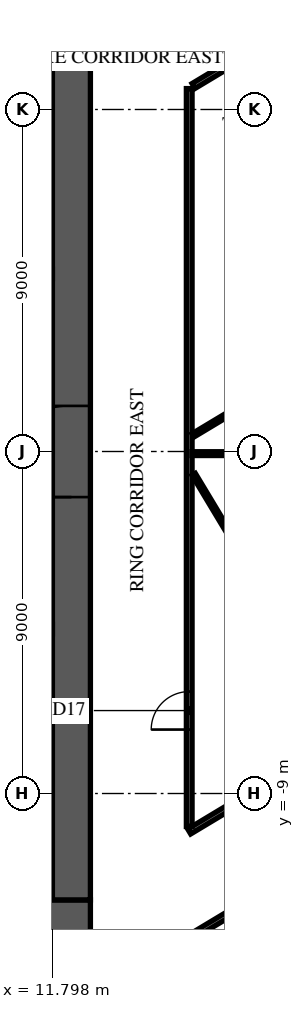
"""IFC4 building model, lengths in metres.
Left out: names, types, materials, properties, quantities, classifications, styles, units other than length and angle.
Written with IfcOpenShell. Run it as: python <this file> out.ifc"""

import sys

from ifc_helpers import new_model, si_unit, direction, frame, frame_2d, origin, place, context, subcontext, project, spatial, rectangle, extrude, element, fill, save


model = new_model("IFC4")
c1 = context("Model", 3, precision=1e-05, world=origin(), true_north=direction((0.0, 1.0)))
c2 = subcontext(c1, "Body", "Model", "MODEL_VIEW")
j1 = project(units=[si_unit("LENGTHUNIT", "METRE"), si_unit("PLANEANGLEUNIT", "RADIAN")], contexts=[c1])
p1 = place(None, origin())
s1 = spatial("IfcSite", under=j1, at=p1, CompositionType="ELEMENT")
p2 = place(p1, origin())
s2 = spatial("IfcBuilding", under=s1, at=p2, CompositionType="ELEMENT")
p3 = place(p2, frame((0.0, 0.0, 147.7)))
s3 = spatial("IfcBuildingStorey", under=s2, at=p3, CompositionType="ELEMENT", Elevation=147.7)
p4 = place(p3, frame((-12.8, -12.3, 0.0), z_axis=(0.0, 0.0, 1.0), x_axis=(1.0, 0.0, 0.0)))
e1 = element("IfcWall", 1, at=p4, inside=s3, PredefinedType="SHEAR", context=c2, shape_type="SweptSolid", body=[
    extrude(rectangle(XDim=25.6, YDim=1.0, at=frame_2d((12.8, 0.0))), origin(), (0.0, 0.0, 1.0), 3.6),
])
p5 = place(p4, frame((7.7, 0.0, 0.0)))
e2 = element("IfcOpeningElement", 2, at=p5, cuts=e1, PredefinedType="OPENING", context=c2, shape_type="SweptSolid", body=[
    extrude(rectangle(XDim=2.0, YDim=2.1, at=frame_2d((1.0, 1.05))), frame((0.0, 0.51, 0.0), z_axis=(0.0, -1.0, 0.0), x_axis=(1.0, 0.0, 0.0)), (0.0, 0.0, 1.0), 1.02),
])
p6 = place(p4, frame((17.825, 0.0, 0.0)))
e3 = element("IfcOpeningElement", 3, at=p6, cuts=e1, PredefinedType="OPENING", context=c2, shape_type="SweptSolid", body=[
    extrude(rectangle(XDim=1.2, YDim=2.1, at=frame_2d((0.6, 1.05))), frame((0.0, 0.51, 0.0), z_axis=(0.0, -1.0, 0.0), x_axis=(1.0, 0.0, 0.0)), (0.0, 0.0, 1.0), 1.02),
])
p7 = place(p4, frame((1.975, 0.0, 0.0)))
e4 = element("IfcOpeningElement", 4, at=p7, cuts=e1, PredefinedType="OPENING", context=c2, shape_type="SweptSolid", body=[
    extrude(rectangle(XDim=1.2, YDim=2.1, at=frame_2d((0.6, 1.05))), frame((0.0, 0.51, 0.0), z_axis=(0.0, -1.0, 0.0), x_axis=(1.0, 0.0, 0.0)), (0.0, 0.0, 1.0), 1.02),
])
p8 = place(p4, frame((22.425, 0.0, 0.0)))
e5 = element("IfcOpeningElement", 5, at=p8, cuts=e1, PredefinedType="OPENING", context=c2, shape_type="SweptSolid", body=[
    extrude(rectangle(XDim=1.2, YDim=2.1, at=frame_2d((0.6, 1.05))), frame((0.0, 0.51, 0.0), z_axis=(0.0, -1.0, 0.0), x_axis=(1.0, 0.0, 0.0)), (0.0, 0.0, 1.0), 1.02),
])
p9 = place(p3, frame((12.3, -11.8, 0.0), z_axis=(0.0, 0.0, 1.0), x_axis=(0.0, 1.0, 0.0)))
e6 = element("IfcWall", 6, at=p9, inside=s3, PredefinedType="SHEAR", context=c2, shape_type="SweptSolid", body=[
    extrude(rectangle(XDim=23.6, YDim=1.0, at=frame_2d((11.8, 0.0))), origin(), (0.0, 0.0, 1.0), 3.6),
])
p10 = place(p9, frame((10.6, 0.0, 0.0)))
e7 = element("IfcOpeningElement", 7, at=p10, cuts=e6, PredefinedType="OPENING", context=c2, shape_type="SweptSolid", body=[
    extrude(rectangle(XDim=2.4, YDim=2.4, at=frame_2d((1.2, 1.2))), frame((0.0, 0.51, 0.0), z_axis=(0.0, -1.0, 0.0), x_axis=(1.0, 0.0, 0.0)), (0.0, 0.0, 1.0), 1.02),
])
for number, where, z_axis, x_axis in (
    (8, (8.65, 4.675, 0.0), (0.0, 0.0, 1.0), (1.0, 0.0, 0.0)),
    (9, (8.65, -4.675, 0.0), (0.0, 0.0, 1.0), (1.0, 0.0, 0.0)),
):
    element("IfcWall", number, at=place(p3, frame(where, z_axis=z_axis, x_axis=x_axis)), inside=s3, PredefinedType="SOLIDWALL", context=c2, shape_type="SweptSolid", body=[
        extrude(rectangle(XDim=3.15, YDim=0.25, at=frame_2d((1.575, 0.0))), origin(), (0.0, 0.0, 1.0), 3.6),
    ])
p11 = place(p3, frame((-7.88, -35.184, 0.0), z_axis=(0.0, 0.0, 1.0), x_axis=(0.857165846238, 0.515040495536, 0.0)))
e10 = element("IfcWall", 10, at=p11, inside=s3, PredefinedType="STANDARD", context=c2, shape_type="SweptSolid", body=[
    extrude(rectangle(XDim=49.751, YDim=0.6, at=frame_2d((24.876, 0.0))), origin(), (0.0, 0.0, 1.0), 3.6),
])
p12 = place(p11, frame((1.161, 0.0, 0.9)))
e11 = element("IfcOpeningElement", 11, at=p12, cuts=e10, PredefinedType="OPENING", context=c2, shape_type="SweptSolid", body=[
    extrude(rectangle(XDim=2.1, YDim=2.1, at=frame_2d((1.05, 1.05))), frame((0.0, 0.31, 0.0), z_axis=(0.0, -1.0, 0.0), x_axis=(1.0, 0.0, 0.0)), (0.0, 0.0, 1.0), 0.62),
])
p13 = place(p11, frame((5.644, 0.0, 0.9)))
e12 = element("IfcOpeningElement", 12, at=p13, cuts=e10, PredefinedType="OPENING", context=c2, shape_type="SweptSolid", body=[
    extrude(rectangle(XDim=2.1, YDim=2.1, at=frame_2d((1.05, 1.05))), frame((0.0, 0.31, 0.0), z_axis=(0.0, -1.0, 0.0), x_axis=(1.0, 0.0, 0.0)), (0.0, 0.0, 1.0), 0.62),
])
p14 = place(p11, frame((10.189, 0.0, 0.9)))
e13 = element("IfcOpeningElement", 13, at=p14, cuts=e10, PredefinedType="OPENING", context=c2, shape_type="SweptSolid", body=[
    extrude(rectangle(XDim=2.1, YDim=2.1, at=frame_2d((1.05, 1.05))), frame((0.0, 0.31, 0.0), z_axis=(0.0, -1.0, 0.0), x_axis=(1.0, 0.0, 0.0)), (0.0, 0.0, 1.0), 0.62),
])
p15 = place(p11, frame((14.735, 0.0, 0.9)))
e14 = element("IfcOpeningElement", 14, at=p15, cuts=e10, PredefinedType="OPENING", context=c2, shape_type="SweptSolid", body=[
    extrude(rectangle(XDim=2.1, YDim=2.1, at=frame_2d((1.05, 1.05))), frame((0.0, 0.31, 0.0), z_axis=(0.0, -1.0, 0.0), x_axis=(1.0, 0.0, 0.0)), (0.0, 0.0, 1.0), 0.62),
])
p16 = place(p11, frame((19.28, 0.0, 0.9)))
e15 = element("IfcOpeningElement", 15, at=p16, cuts=e10, PredefinedType="OPENING", context=c2, shape_type="SweptSolid", body=[
    extrude(rectangle(XDim=2.1, YDim=2.1, at=frame_2d((1.05, 1.05))), frame((0.0, 0.31, 0.0), z_axis=(0.0, -1.0, 0.0), x_axis=(1.0, 0.0, 0.0)), (0.0, 0.0, 1.0), 0.62),
])
p17 = place(p11, frame((23.826, 0.0, 0.9)))
e16 = element("IfcOpeningElement", 16, at=p17, cuts=e10, PredefinedType="OPENING", context=c2, shape_type="SweptSolid", body=[
    extrude(rectangle(XDim=2.1, YDim=2.1, at=frame_2d((1.05, 1.05))), frame((0.0, 0.31, 0.0), z_axis=(0.0, -1.0, 0.0), x_axis=(1.0, 0.0, 0.0)), (0.0, 0.0, 1.0), 0.62),
])
p18 = place(p11, frame((28.371, 0.0, 0.9)))
e17 = element("IfcOpeningElement", 17, at=p18, cuts=e10, PredefinedType="OPENING", context=c2, shape_type="SweptSolid", body=[
    extrude(rectangle(XDim=2.1, YDim=2.1, at=frame_2d((1.05, 1.05))), frame((0.0, 0.31, 0.0), z_axis=(0.0, -1.0, 0.0), x_axis=(1.0, 0.0, 0.0)), (0.0, 0.0, 1.0), 0.62),
])
p19 = place(p11, frame((32.917, 0.0, 0.9)))
e18 = element("IfcOpeningElement", 18, at=p19, cuts=e10, PredefinedType="OPENING", context=c2, shape_type="SweptSolid", body=[
    extrude(rectangle(XDim=2.1, YDim=2.1, at=frame_2d((1.05, 1.05))), frame((0.0, 0.31, 0.0), z_axis=(0.0, -1.0, 0.0), x_axis=(1.0, 0.0, 0.0)), (0.0, 0.0, 1.0), 0.62),
])
p20 = place(p11, frame((37.462, 0.0, 0.9)))
e19 = element("IfcOpeningElement", 19, at=p20, cuts=e10, PredefinedType="OPENING", context=c2, shape_type="SweptSolid", body=[
    extrude(rectangle(XDim=2.1, YDim=2.1, at=frame_2d((1.05, 1.05))), frame((0.0, 0.31, 0.0), z_axis=(0.0, -1.0, 0.0), x_axis=(1.0, 0.0, 0.0)), (0.0, 0.0, 1.0), 0.62),
])
p21 = place(p11, frame((42.008, 0.0, 0.9)))
e20 = element("IfcOpeningElement", 20, at=p21, cuts=e10, PredefinedType="OPENING", context=c2, shape_type="SweptSolid", body=[
    extrude(rectangle(XDim=2.1, YDim=2.1, at=frame_2d((1.05, 1.05))), frame((0.0, 0.31, 0.0), z_axis=(0.0, -1.0, 0.0), x_axis=(1.0, 0.0, 0.0)), (0.0, 0.0, 1.0), 0.62),
])
p22 = place(p11, frame((46.491, 0.0, 0.9)))
e21 = element("IfcOpeningElement", 21, at=p22, cuts=e10, PredefinedType="OPENING", context=c2, shape_type="SweptSolid", body=[
    extrude(rectangle(XDim=2.1, YDim=2.1, at=frame_2d((1.05, 1.05))), frame((0.0, 0.31, 0.0), z_axis=(0.0, -1.0, 0.0), x_axis=(1.0, 0.0, 0.0)), (0.0, 0.0, 1.0), 0.62),
])
p23 = place(p3, frame((36.416, -2.94, 0.0), z_axis=(0.0, 0.0, 1.0), x_axis=(-0.515039615037, 0.857166375299, 0.0)))
e22 = element("IfcWall", 22, at=p23, inside=s3, PredefinedType="STANDARD", context=c2, shape_type="SweptSolid", body=[
    extrude(rectangle(XDim=42.176, YDim=0.6, at=frame_2d((21.088, 0.0))), origin(), (0.0, 0.0, 1.0), 3.6),
])
p24 = place(p23, frame((1.138, 0.0, 0.9)))
e23 = element("IfcOpeningElement", 23, at=p24, cuts=e22, PredefinedType="OPENING", context=c2, shape_type="SweptSolid", body=[
    extrude(rectangle(XDim=2.3, YDim=2.1, at=frame_2d((1.15, 1.05))), frame((0.0, 0.31, 0.0), z_axis=(0.0, -1.0, 0.0), x_axis=(1.0, 0.0, 0.0)), (0.0, 0.0, 1.0), 0.62),
])
p25 = place(p23, frame((5.776, 0.0, 0.9)))
e24 = element("IfcOpeningElement", 24, at=p25, cuts=e22, PredefinedType="OPENING", context=c2, shape_type="SweptSolid", body=[
    extrude(rectangle(XDim=2.3, YDim=2.1, at=frame_2d((1.15, 1.05))), frame((0.0, 0.31, 0.0), z_axis=(0.0, -1.0, 0.0), x_axis=(1.0, 0.0, 0.0)), (0.0, 0.0, 1.0), 0.62),
])
p26 = place(p23, frame((10.476, 0.0, 0.9)))
e25 = element("IfcOpeningElement", 25, at=p26, cuts=e22, PredefinedType="OPENING", context=c2, shape_type="SweptSolid", body=[
    extrude(rectangle(XDim=2.3, YDim=2.1, at=frame_2d((1.15, 1.05))), frame((0.0, 0.31, 0.0), z_axis=(0.0, -1.0, 0.0), x_axis=(1.0, 0.0, 0.0)), (0.0, 0.0, 1.0), 0.62),
])
p27 = place(p23, frame((15.176, 0.0, 0.9)))
e26 = element("IfcOpeningElement", 26, at=p27, cuts=e22, PredefinedType="OPENING", context=c2, shape_type="SweptSolid", body=[
    extrude(rectangle(XDim=2.3, YDim=2.1, at=frame_2d((1.15, 1.05))), frame((0.0, 0.31, 0.0), z_axis=(0.0, -1.0, 0.0), x_axis=(1.0, 0.0, 0.0)), (0.0, 0.0, 1.0), 0.62),
])
p28 = place(p23, frame((19.876, 0.0, 0.9)))
e27 = element("IfcOpeningElement", 27, at=p28, cuts=e22, PredefinedType="OPENING", context=c2, shape_type="SweptSolid", body=[
    extrude(rectangle(XDim=2.3, YDim=2.1, at=frame_2d((1.15, 1.05))), frame((0.0, 0.31, 0.0), z_axis=(0.0, -1.0, 0.0), x_axis=(1.0, 0.0, 0.0)), (0.0, 0.0, 1.0), 0.62),
])
p29 = place(p23, frame((24.576, 0.0, 0.9)))
e28 = element("IfcOpeningElement", 28, at=p29, cuts=e22, PredefinedType="OPENING", context=c2, shape_type="SweptSolid", body=[
    extrude(rectangle(XDim=2.3, YDim=2.1, at=frame_2d((1.15, 1.05))), frame((0.0, 0.31, 0.0), z_axis=(0.0, -1.0, 0.0), x_axis=(1.0, 0.0, 0.0)), (0.0, 0.0, 1.0), 0.62),
])
p30 = place(p23, frame((29.276, 0.0, 0.9)))
e29 = element("IfcOpeningElement", 29, at=p30, cuts=e22, PredefinedType="OPENING", context=c2, shape_type="SweptSolid", body=[
    extrude(rectangle(XDim=2.3, YDim=2.1, at=frame_2d((1.15, 1.05))), frame((0.0, 0.31, 0.0), z_axis=(0.0, -1.0, 0.0), x_axis=(1.0, 0.0, 0.0)), (0.0, 0.0, 1.0), 0.62),
])
p31 = place(p23, frame((33.976, 0.0, 0.9)))
e30 = element("IfcOpeningElement", 30, at=p31, cuts=e22, PredefinedType="OPENING", context=c2, shape_type="SweptSolid", body=[
    extrude(rectangle(XDim=2.3, YDim=2.1, at=frame_2d((1.15, 1.05))), frame((0.0, 0.31, 0.0), z_axis=(0.0, -1.0, 0.0), x_axis=(1.0, 0.0, 0.0)), (0.0, 0.0, 1.0), 0.62),
])
p32 = place(p23, frame((38.676, 0.0, 0.9)))
e31 = element("IfcOpeningElement", 31, at=p32, cuts=e22, PredefinedType="OPENING", context=c2, shape_type="SweptSolid", body=[
    extrude(rectangle(XDim=2.3, YDim=2.1, at=frame_2d((1.15, 1.05))), frame((0.0, 0.31, 0.0), z_axis=(0.0, -1.0, 0.0), x_axis=(1.0, 0.0, 0.0)), (0.0, 0.0, 1.0), 0.62),
])
p33 = place(p3, frame((-4.341, -24.661, 0.0), z_axis=(0.0, 0.0, 1.0), x_axis=(0.85716751976, 0.515037710336, 0.0)))
e32 = element("IfcWall", 32, at=p33, inside=s3, PredefinedType="PARTITIONING", context=c2, shape_type="SweptSolid", body=[
    extrude(rectangle(XDim=32.919, YDim=0.15, at=frame_2d((16.459, 0.0))), origin(), (0.0, 0.0, 1.0), 3.15),
])
p34 = place(p33, frame((11.932, 0.0, 0.0)))
e33 = element("IfcOpeningElement", 33, at=p34, cuts=e32, PredefinedType="OPENING", context=c2, shape_type="SweptSolid", body=[
    extrude(rectangle(XDim=1.0, YDim=2.1, at=frame_2d((0.5, 1.05))), frame((0.0, 0.085, 0.0), z_axis=(0.0, -1.0, 0.0), x_axis=(1.0, 0.0, 0.0)), (0.0, 0.0, 1.0), 0.17),
])
p35 = place(p33, frame((25.18, 0.0, 0.0)))
e34 = element("IfcOpeningElement", 34, at=p35, cuts=e32, PredefinedType="OPENING", context=c2, shape_type="SweptSolid", body=[
    extrude(rectangle(XDim=1.0, YDim=2.1, at=frame_2d((0.5, 1.05))), frame((0.0, 0.085, 0.0), z_axis=(0.0, -1.0, 0.0), x_axis=(1.0, 0.0, 0.0)), (0.0, 0.0, 1.0), 0.17),
])
p36 = place(p33, frame((30.035, 0.0, 0.0)))
e35 = element("IfcOpeningElement", 35, at=p36, cuts=e32, PredefinedType="OPENING", context=c2, shape_type="SweptSolid", body=[
    extrude(rectangle(XDim=1.0, YDim=2.1, at=frame_2d((0.5, 1.05))), frame((0.0, 0.085, 0.0), z_axis=(0.0, -1.0, 0.0), x_axis=(1.0, 0.0, 0.0)), (0.0, 0.0, 1.0), 0.17),
])
p37 = place(p3, frame((11.76, 23.633, 0.0), z_axis=(0.0, 0.0, 1.0), x_axis=(0.515060503771, -0.857153823684, 0.0)))
e36 = element("IfcWall", 36, at=p37, inside=s3, PredefinedType="PARTITIONING", context=c2, shape_type="SweptSolid", body=[
    extrude(rectangle(XDim=28.475, YDim=0.15, at=frame_2d((14.238, 0.0))), origin(), (0.0, 0.0, 1.0), 3.15),
])
p38 = place(p37, frame((12.149, 0.0, 0.0)))
e37 = element("IfcOpeningElement", 37, at=p38, cuts=e36, PredefinedType="OPENING", context=c2, shape_type="SweptSolid", body=[
    extrude(rectangle(XDim=1.0, YDim=2.1, at=frame_2d((0.5, 1.05))), frame((0.0, 0.085, 0.0), z_axis=(0.0, -1.0, 0.0), x_axis=(1.0, 0.0, 0.0)), (0.0, 0.0, 1.0), 0.17),
])
p39 = place(p37, frame((19.62, 0.0, 0.0)))
e38 = element("IfcOpeningElement", 38, at=p39, cuts=e36, PredefinedType="OPENING", context=c2, shape_type="SweptSolid", body=[
    extrude(rectangle(XDim=1.0, YDim=2.1, at=frame_2d((0.5, 1.05))), frame((0.0, 0.085, 0.0), z_axis=(0.0, -1.0, 0.0), x_axis=(1.0, 0.0, 0.0)), (0.0, 0.0, 1.0), 0.17),
])
p40 = place(p37, frame((26.005, 0.0, 0.0)))
e39 = element("IfcOpeningElement", 39, at=p40, cuts=e36, PredefinedType="OPENING", context=c2, shape_type="SweptSolid", body=[
    extrude(rectangle(XDim=1.8, YDim=2.1, at=frame_2d((0.9, 1.05))), frame((0.0, 0.085, 0.0), z_axis=(0.0, -1.0, 0.0), x_axis=(1.0, 0.0, 0.0)), (0.0, 0.0, 1.0), 0.17),
])
p41 = place(p3, frame((15.4, -10.0, 0.0), z_axis=(0.0, 0.0, 1.0), x_axis=(0.857122913924, 0.515111939705, 0.0)))
e40 = element("IfcWall", 40, at=p41, inside=s3, PredefinedType="PARTITIONING", context=c2, shape_type="SweptSolid", body=[
    extrude(rectangle(XDim=8.447, YDim=0.15, at=frame_2d((4.223, 0.0))), origin(), (0.0, 0.0, 1.0), 3.15),
])
p42 = place(p3, frame((15.4, -9.867, 0.0), z_axis=(0.0, 0.0, 1.0), x_axis=(0.0, 1.0, 0.0)))
e41 = element("IfcWall", 41, at=p42, inside=s3, PredefinedType="PARTITIONING", context=c2, shape_type="SweptSolid", body=[
    extrude(rectangle(XDim=19.417, YDim=0.15, at=frame_2d((9.709, 0.0))), origin(), (0.0, 0.0, 1.0), 3.15),
])
p43 = place(p42, frame((2.55, 0.0, 0.0)))
e42 = element("IfcOpeningElement", 42, at=p43, cuts=e41, PredefinedType="OPENING", context=c2, shape_type="SweptSolid", body=[
    extrude(rectangle(XDim=1.0, YDim=2.1, at=frame_2d((0.5, 1.05))), frame((0.0, 0.085, 0.0), z_axis=(0.0, -1.0, 0.0), x_axis=(1.0, 0.0, 0.0)), (0.0, 0.0, 1.0), 0.17),
])
p44 = place(p3, frame((15.514, 9.618, 0.0), z_axis=(0.0, 0.0, 1.0), x_axis=(0.857129434102, 0.515101090268, 0.0)))
e43 = element("IfcWall", 43, at=p44, inside=s3, PredefinedType="PARTITIONING", context=c2, shape_type="SweptSolid", body=[
    extrude(rectangle(XDim=1.601, YDim=0.15, at=frame_2d((0.801, 0.0))), origin(), (0.0, 0.0, 1.0), 3.15),
])
p45 = place(p3, frame((15.475, -0.056, 0.0), z_axis=(0.0, 0.0, 1.0), x_axis=(1.0, 0.0, 0.0)))
e44 = element("IfcWall", 44, at=p45, inside=s3, PredefinedType="PARTITIONING", context=c2, shape_type="SweptSolid", body=[
    extrude(rectangle(XDim=7.602, YDim=0.1, at=frame_2d((3.801, 0.0))), origin(), (0.0, 0.0, 1.0), 3.6),
])
p46 = place(p3, frame((15.501, 0.426, 0.0), z_axis=(0.0, 0.0, 1.0), x_axis=(0.857114899057, 0.515125275845, 0.0)))
e45 = element("IfcWall", 45, at=p46, inside=s3, PredefinedType="PARTITIONING", context=c2, shape_type="SweptSolid", body=[
    extrude(rectangle(XDim=6.272, YDim=0.1, at=frame_2d((3.136, 0.0))), origin(), (0.0, 0.0, 1.0), 3.15),
])
p47 = place(p3, frame((15.518, -0.601, 0.0), z_axis=(0.0, 0.0, 1.0), x_axis=(0.515094007399, -0.857133690588, 0.0)))
e46 = element("IfcWall", 46, at=p47, inside=s3, PredefinedType="PARTITIONING", context=c2, shape_type="SweptSolid", body=[
    extrude(rectangle(XDim=7.92, YDim=0.1, at=frame_2d((3.96, 0.0))), origin(), (0.0, 0.0, 1.0), 3.15),
])
p48 = place(p10, origin())
e47 = element("IfcDoor", 47, at=p48, inside=s3, OperationType="SINGLE_SWING_LEFT", PredefinedType="DOOR", context=c2, shape_type="SweptSolid", body=[
    extrude(rectangle(XDim=2.4, YDim=2.4, at=frame_2d((1.2, 1.2))), frame((0.0, 0.025, 0.0), z_axis=(0.0, -1.0, 0.0), x_axis=(1.0, 0.0, 0.0)), (0.0, 0.0, 1.0), 0.05),
])
fill(e7, e47)
p49 = place(p43, frame((1.0, 0.0, 0.0), z_axis=(0.0, 0.0, 1.0), x_axis=(-1.0, 0.0, 0.0)))
e48 = element("IfcDoor", 48, at=p49, inside=s3, OperationType="SINGLE_SWING_RIGHT", PredefinedType="DOOR", context=c2, shape_type="SweptSolid", body=[
    extrude(rectangle(XDim=1.0, YDim=2.1, at=frame_2d((0.5, 1.05))), frame((0.0, 0.025, 0.0), z_axis=(0.0, -1.0, 0.0), x_axis=(1.0, 0.0, 0.0)), (0.0, 0.0, 1.0), 0.05),
])
fill(e42, e48)
save(model, sys.argv[1])
